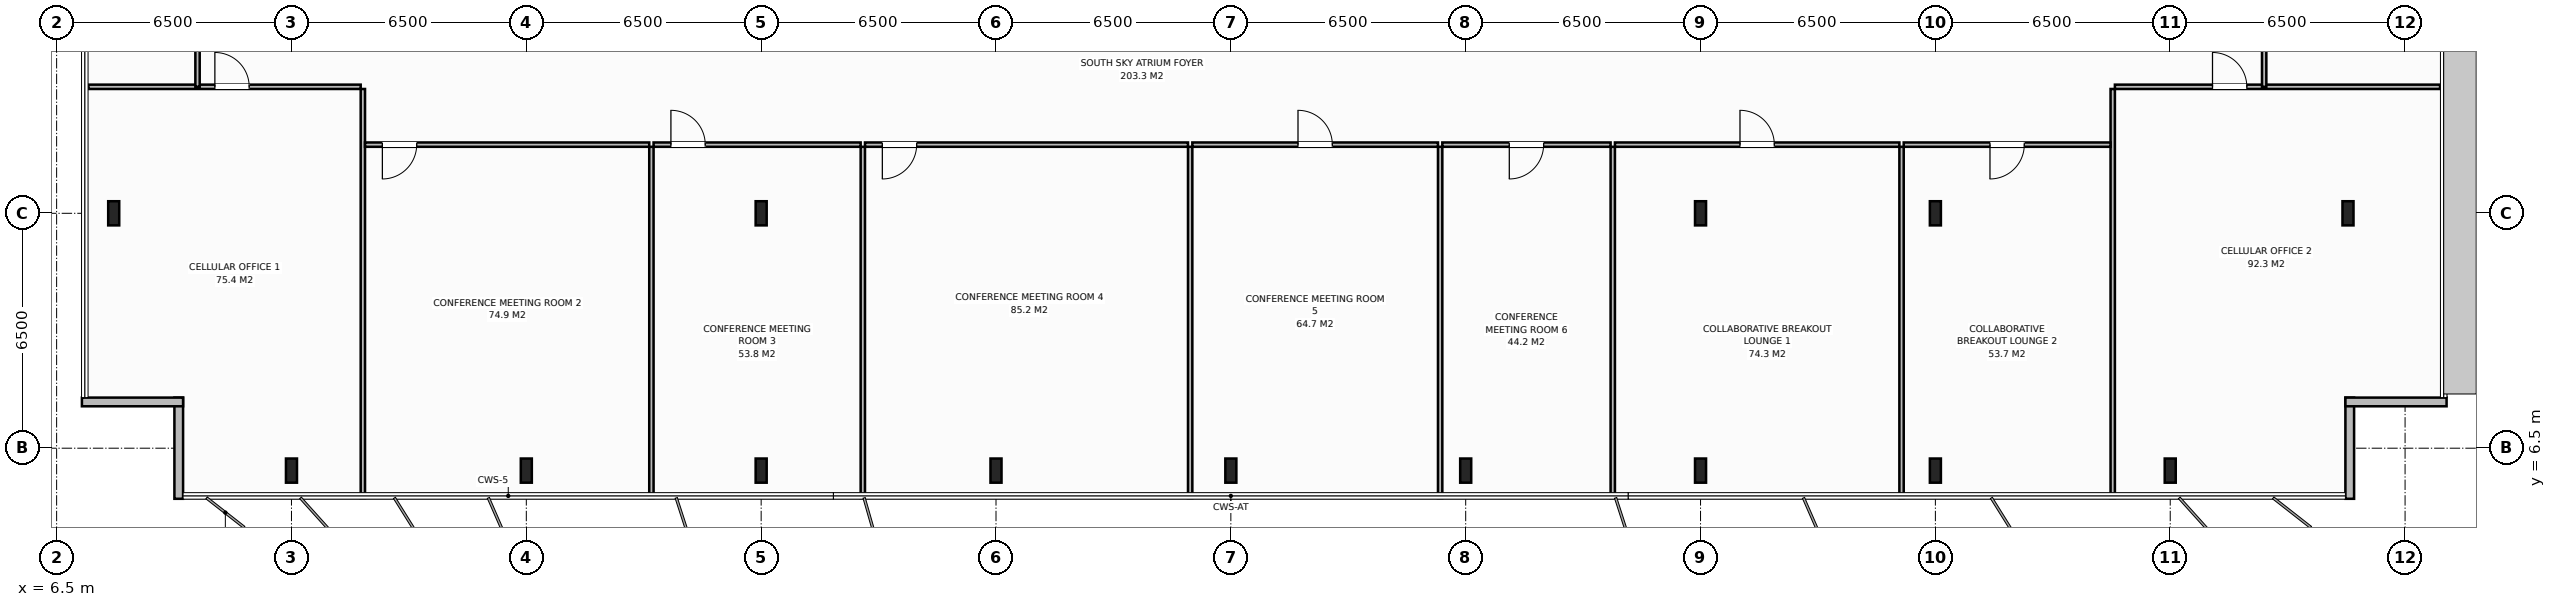
"""IFC4 building model, lengths in metres.
Left out: names, types, materials, properties, quantities, classifications, styles, units other than length and angle.
Written with IfcOpenShell. Run it as: python <this file> out.ifc"""

import sys

from ifc_helpers import new_model, si_unit, direction, frame, frame_2d, origin, origin_2d, place, context, subcontext, project, spatial, rectangle, i_section, extrude, element, fill, save


model = new_model("IFC4")
c1 = context("Model", 3, precision=1e-05, world=origin(), true_north=direction((0.0, 1.0)))
c2 = subcontext(c1, "Body", "Model", "MODEL_VIEW")
j1 = project(units=[si_unit("LENGTHUNIT", "METRE"), si_unit("PLANEANGLEUNIT", "RADIAN")], contexts=[c1])
p1 = place(None, origin())
s1 = spatial("IfcSite", under=j1, at=p1, CompositionType="ELEMENT")
p2 = place(p1, origin())
s2 = spatial("IfcBuilding", under=s1, at=p2, CompositionType="ELEMENT")
p3 = place(p2, frame((0.0, 0.0, 282.4)))
s3 = spatial("IfcBuildingStorey", under=s2, at=p3, CompositionType="ELEMENT", Elevation=282.4)
for number, where, z_axis, x_axis in (
    (1, (58.5, 13.0, 0.0), (0.0, 0.0, 1.0), (1.0, 0.0, 0.0)),
    (2, (26.0, 13.0, 0.0), (0.0, 0.0, 1.0), (1.0, 0.0, 0.0)),
    (3, (52.0, 13.0, 0.0), (0.0, 0.0, 1.0), (1.0, 0.0, 0.0)),
    (4, (13.0, 5.88, 0.0), (0.0, 0.0, 1.0), (1.0, 0.0, 0.0)),
    (5, (19.5, 5.88, 0.0), (0.0, 0.0, 1.0), (1.0, 0.0, 0.0)),
    (6, (26.0, 5.88, 0.0), (0.0, 0.0, 1.0), (1.0, 0.0, 0.0)),
    (7, (32.5, 5.88, 0.0), (0.0, 0.0, 1.0), (1.0, 0.0, 0.0)),
    (8, (39.0, 5.88, 0.0), (0.0, 0.0, 1.0), (1.0, 0.0, 0.0)),
    (9, (45.5, 5.88, 0.0), (0.0, 0.0, 1.0), (1.0, 0.0, 0.0)),
    (10, (52.0, 5.88, 0.0), (0.0, 0.0, 1.0), (1.0, 0.0, 0.0)),
    (11, (58.5, 5.88, 0.0), (0.0, 0.0, 1.0), (1.0, 0.0, 0.0)),
    (12, (65.0, 5.88, 0.0), (0.0, 0.0, 1.0), (1.0, 0.0, 0.0)),
    (13, (8.08, 13.0, 0.0), (0.0, 0.0, 1.0), (1.0, 0.0, 0.0)),
    (14, (69.92, 13.0, 0.0), (0.0, 0.0, 1.0), (1.0, 0.0, 0.0)),
):
    element("IfcColumn", number, at=place(p3, frame(where, z_axis=z_axis, x_axis=x_axis)), inside=s3, PredefinedType="COLUMN", context=c2, shape_type="SweptSolid", body=[
        extrude(i_section(OverallWidth=0.305, OverallDepth=0.668, WebThickness=0.021, FlangeThickness=0.04, at=origin_2d()), origin(), (0.0, 0.0, 1.0), 4.0),
    ])
p4 = place(p3, frame((9.88, 5.1, 0.0), z_axis=(0.0, 0.0, 1.0), x_axis=(0.0, 1.0, 0.0)))
e15 = element("IfcWall", 15, at=p4, inside=s3, PredefinedType="STANDARD", context=c2, shape_type="SweptSolid", body=[
    extrude(rectangle(XDim=2.8, YDim=0.24, at=frame_2d((1.4, 0.0))), origin(), (0.0, 0.0, 1.0), 3.788),
])
p5 = place(p3, frame((10.0, 7.78, 0.0), z_axis=(0.0, 0.0, 1.0), x_axis=(-1.0, 0.0, 0.0)))
e16 = element("IfcWall", 16, at=p5, inside=s3, PredefinedType="STANDARD", context=c2, shape_type="SweptSolid", body=[
    extrude(rectangle(XDim=2.8, YDim=0.24, at=frame_2d((1.4, 0.0))), origin(), (0.0, 0.0, 1.0), 3.788),
])
p6 = place(p3, frame((69.969, 7.9, 0.0), z_axis=(0.0, 0.0, 1.0), x_axis=(0.0, -1.0, 0.0)))
e17 = element("IfcWall", 17, at=p6, inside=s3, PredefinedType="STANDARD", context=c2, shape_type="SweptSolid", body=[
    extrude(rectangle(XDim=2.8, YDim=0.24, at=frame_2d((1.4, 0.0))), origin(), (0.0, 0.0, 1.0), 3.788),
])
p7 = place(p3, frame((72.649, 7.78, 0.0), z_axis=(0.0, 0.0, 1.0), x_axis=(-1.0, 0.0, 0.0)))
e18 = element("IfcWall", 18, at=p7, inside=s3, PredefinedType="STANDARD", context=c2, shape_type="SweptSolid", body=[
    extrude(rectangle(XDim=2.8, YDim=0.24, at=frame_2d((1.4, 0.0))), origin(), (0.0, 0.0, 1.0), 3.788),
])
p8 = place(p3, frame((14.976, 5.12, 0.0), z_axis=(0.0, 0.0, 1.0), x_axis=(0.0, 1.0, 0.0)))
e19 = element("IfcWall", 19, at=p8, inside=s3, PredefinedType="PARTITIONING", context=c2, shape_type="SweptSolid", body=[
    extrude(rectangle(XDim=11.32, YDim=0.12, at=frame_2d((5.66, 0.0))), origin(), (0.0, 0.0, 1.0), 3.788),
])
p9 = place(p3, frame((7.38, 16.5, 0.0), z_axis=(0.0, 0.0, 1.0), x_axis=(1.0, 0.0, 0.0)))
e20 = element("IfcWall", 20, at=p9, inside=s3, PredefinedType="PARTITIONING", context=c2, shape_type="SweptSolid", body=[
    extrude(rectangle(XDim=7.536, YDim=0.12, at=frame_2d((3.768, 0.0))), origin(), (0.0, 0.0, 1.0), 3.788),
])
p10 = place(p9, frame((3.5, 0.0, 0.0)))
e21 = element("IfcOpeningElement", 21, at=p10, cuts=e20, PredefinedType="OPENING", context=c2, shape_type="SweptSolid", body=[
    extrude(rectangle(XDim=0.95, YDim=2.15, at=frame_2d((0.475, 1.075))), frame((0.0, 0.07, 0.0), z_axis=(0.0, -1.0, 0.0), x_axis=(1.0, 0.0, 0.0)), (0.0, 0.0, 1.0), 0.14),
])
p11 = place(p3, frame((22.962, 5.12, 0.0), z_axis=(0.0, 0.0, 1.0), x_axis=(0.0, 1.0, 0.0)))
e22 = element("IfcWall", 22, at=p11, inside=s3, PredefinedType="PARTITIONING", context=c2, shape_type="SweptSolid", body=[
    extrude(rectangle(XDim=9.72, YDim=0.12, at=frame_2d((4.86, 0.0))), origin(), (0.0, 0.0, 1.0), 3.788),
])
p12 = place(p3, frame((15.036, 14.9, 0.0), z_axis=(0.0, 0.0, 1.0), x_axis=(1.0, 0.0, 0.0)))
e23 = element("IfcWall", 23, at=p12, inside=s3, PredefinedType="PARTITIONING", context=c2, shape_type="SweptSolid", body=[
    extrude(rectangle(XDim=7.866, YDim=0.12, at=frame_2d((3.933, 0.0))), origin(), (0.0, 0.0, 1.0), 3.788),
])
p13 = place(p12, frame((0.48, 0.0, 0.0)))
e24 = element("IfcOpeningElement", 24, at=p13, cuts=e23, PredefinedType="OPENING", context=c2, shape_type="SweptSolid", body=[
    extrude(rectangle(XDim=0.95, YDim=2.15, at=frame_2d((0.475, 1.075))), frame((0.0, 0.07, 0.0), z_axis=(0.0, -1.0, 0.0), x_axis=(1.0, 0.0, 0.0)), (0.0, 0.0, 1.0), 0.14),
])
p14 = place(p3, frame((28.814, 5.12, 0.0), z_axis=(0.0, 0.0, 1.0), x_axis=(0.0, 1.0, 0.0)))
e25 = element("IfcWall", 25, at=p14, inside=s3, PredefinedType="PARTITIONING", context=c2, shape_type="SweptSolid", body=[
    extrude(rectangle(XDim=9.72, YDim=0.12, at=frame_2d((4.86, 0.0))), origin(), (0.0, 0.0, 1.0), 3.788),
])
p15 = place(p3, frame((23.022, 14.9, 0.0), z_axis=(0.0, 0.0, 1.0), x_axis=(1.0, 0.0, 0.0)))
e26 = element("IfcWall", 26, at=p15, inside=s3, PredefinedType="PARTITIONING", context=c2, shape_type="SweptSolid", body=[
    extrude(rectangle(XDim=5.732, YDim=0.12, at=frame_2d((2.866, 0.0))), origin(), (0.0, 0.0, 1.0), 3.788),
])
p16 = place(p15, frame((0.48, 0.0, 0.0)))
e27 = element("IfcOpeningElement", 27, at=p16, cuts=e26, PredefinedType="OPENING", context=c2, shape_type="SweptSolid", body=[
    extrude(rectangle(XDim=0.95, YDim=2.15, at=frame_2d((0.475, 1.075))), frame((0.0, 0.07, 0.0), z_axis=(0.0, -1.0, 0.0), x_axis=(1.0, 0.0, 0.0)), (0.0, 0.0, 1.0), 0.14),
])
p17 = place(p3, frame((37.874, 5.12, 0.0), z_axis=(0.0, 0.0, 1.0), x_axis=(0.0, 1.0, 0.0)))
e28 = element("IfcWall", 28, at=p17, inside=s3, PredefinedType="PARTITIONING", context=c2, shape_type="SweptSolid", body=[
    extrude(rectangle(XDim=9.72, YDim=0.12, at=frame_2d((4.86, 0.0))), origin(), (0.0, 0.0, 1.0), 3.788),
])
p18 = place(p3, frame((28.874, 14.9, 0.0), z_axis=(0.0, 0.0, 1.0), x_axis=(1.0, 0.0, 0.0)))
e29 = element("IfcWall", 29, at=p18, inside=s3, PredefinedType="PARTITIONING", context=c2, shape_type="SweptSolid", body=[
    extrude(rectangle(XDim=8.94, YDim=0.12, at=frame_2d((4.47, 0.0))), origin(), (0.0, 0.0, 1.0), 3.788),
])
p19 = place(p18, frame((0.48, 0.0, 0.0)))
e30 = element("IfcOpeningElement", 30, at=p19, cuts=e29, PredefinedType="OPENING", context=c2, shape_type="SweptSolid", body=[
    extrude(rectangle(XDim=0.95, YDim=2.15, at=frame_2d((0.475, 1.075))), frame((0.0, 0.07, 0.0), z_axis=(0.0, -1.0, 0.0), x_axis=(1.0, 0.0, 0.0)), (0.0, 0.0, 1.0), 0.14),
])
p20 = place(p3, frame((44.793, 5.12, 0.0), z_axis=(0.0, 0.0, 1.0), x_axis=(0.0, 1.0, 0.0)))
e31 = element("IfcWall", 31, at=p20, inside=s3, PredefinedType="PARTITIONING", context=c2, shape_type="SweptSolid", body=[
    extrude(rectangle(XDim=9.72, YDim=0.12, at=frame_2d((4.86, 0.0))), origin(), (0.0, 0.0, 1.0), 3.788),
])
p21 = place(p3, frame((37.934, 14.9, 0.0), z_axis=(0.0, 0.0, 1.0), x_axis=(1.0, 0.0, 0.0)))
e32 = element("IfcWall", 32, at=p21, inside=s3, PredefinedType="PARTITIONING", context=c2, shape_type="SweptSolid", body=[
    extrude(rectangle(XDim=6.799, YDim=0.12, at=frame_2d((3.399, 0.0))), origin(), (0.0, 0.0, 1.0), 3.788),
])
p22 = place(p21, frame((2.925, 0.0, 0.0)))
e33 = element("IfcOpeningElement", 33, at=p22, cuts=e32, PredefinedType="OPENING", context=c2, shape_type="SweptSolid", body=[
    extrude(rectangle(XDim=0.95, YDim=2.15, at=frame_2d((0.475, 1.075))), frame((0.0, 0.07, 0.0), z_axis=(0.0, -1.0, 0.0), x_axis=(1.0, 0.0, 0.0)), (0.0, 0.0, 1.0), 0.14),
])
p23 = place(p3, frame((49.571, 5.12, 0.0), z_axis=(0.0, 0.0, 1.0), x_axis=(0.0, 1.0, 0.0)))
e34 = element("IfcWall", 34, at=p23, inside=s3, PredefinedType="PARTITIONING", context=c2, shape_type="SweptSolid", body=[
    extrude(rectangle(XDim=9.72, YDim=0.12, at=frame_2d((4.86, 0.0))), origin(), (0.0, 0.0, 1.0), 3.788),
])
p24 = place(p3, frame((44.853, 14.9, 0.0), z_axis=(0.0, 0.0, 1.0), x_axis=(1.0, 0.0, 0.0)))
e35 = element("IfcWall", 35, at=p24, inside=s3, PredefinedType="PARTITIONING", context=c2, shape_type="SweptSolid", body=[
    extrude(rectangle(XDim=4.657, YDim=0.12, at=frame_2d((2.329, 0.0))), origin(), (0.0, 0.0, 1.0), 3.788),
])
p25 = place(p24, frame((1.854, 0.0, 0.0)))
e36 = element("IfcOpeningElement", 36, at=p25, cuts=e35, PredefinedType="OPENING", context=c2, shape_type="SweptSolid", body=[
    extrude(rectangle(XDim=0.95, YDim=2.15, at=frame_2d((0.475, 1.075))), frame((0.0, 0.07, 0.0), z_axis=(0.0, -1.0, 0.0), x_axis=(1.0, 0.0, 0.0)), (0.0, 0.0, 1.0), 0.14),
])
p26 = place(p3, frame((57.563, 5.12, 0.0), z_axis=(0.0, 0.0, 1.0), x_axis=(0.0, 1.0, 0.0)))
e37 = element("IfcWall", 37, at=p26, inside=s3, PredefinedType="PARTITIONING", context=c2, shape_type="SweptSolid", body=[
    extrude(rectangle(XDim=9.72, YDim=0.12, at=frame_2d((4.86, 0.0))), origin(), (0.0, 0.0, 1.0), 3.788),
])
p27 = place(p3, frame((49.631, 14.9, 0.0), z_axis=(0.0, 0.0, 1.0), x_axis=(1.0, 0.0, 0.0)))
e38 = element("IfcWall", 38, at=p27, inside=s3, PredefinedType="PARTITIONING", context=c2, shape_type="SweptSolid", body=[
    extrude(rectangle(XDim=7.873, YDim=0.12, at=frame_2d((3.937, 0.0))), origin(), (0.0, 0.0, 1.0), 3.788),
])
p28 = place(p27, frame((3.461, 0.0, 0.0)))
e39 = element("IfcOpeningElement", 39, at=p28, cuts=e38, PredefinedType="OPENING", context=c2, shape_type="SweptSolid", body=[
    extrude(rectangle(XDim=0.95, YDim=2.15, at=frame_2d((0.475, 1.075))), frame((0.0, 0.07, 0.0), z_axis=(0.0, -1.0, 0.0), x_axis=(1.0, 0.0, 0.0)), (0.0, 0.0, 1.0), 0.14),
])
p29 = place(p3, frame((63.408, 5.12, 0.0), z_axis=(0.0, 0.0, 1.0), x_axis=(0.0, 1.0, 0.0)))
e40 = element("IfcWall", 40, at=p29, inside=s3, PredefinedType="PARTITIONING", context=c2, shape_type="SweptSolid", body=[
    extrude(rectangle(XDim=11.32, YDim=0.12, at=frame_2d((5.66, 0.0))), origin(), (0.0, 0.0, 1.0), 3.788),
])
p30 = place(p3, frame((57.624, 14.9, 0.0), z_axis=(0.0, 0.0, 1.0), x_axis=(1.0, 0.0, 0.0)))
e41 = element("IfcWall", 41, at=p30, inside=s3, PredefinedType="PARTITIONING", context=c2, shape_type="SweptSolid", body=[
    extrude(rectangle(XDim=5.725, YDim=0.12, at=frame_2d((2.862, 0.0))), origin(), (0.0, 0.0, 1.0), 3.788),
])
p31 = place(p30, frame((2.387, 0.0, 0.0)))
e42 = element("IfcOpeningElement", 42, at=p31, cuts=e41, PredefinedType="OPENING", context=c2, shape_type="SweptSolid", body=[
    extrude(rectangle(XDim=0.95, YDim=2.15, at=frame_2d((0.475, 1.075))), frame((0.0, 0.07, 0.0), z_axis=(0.0, -1.0, 0.0), x_axis=(1.0, 0.0, 0.0)), (0.0, 0.0, 1.0), 0.14),
])
p32 = place(p3, frame((63.469, 16.5, 0.0), z_axis=(0.0, 0.0, 1.0), x_axis=(1.0, 0.0, 0.0)))
e43 = element("IfcWall", 43, at=p32, inside=s3, PredefinedType="PARTITIONING", context=c2, shape_type="SweptSolid", body=[
    extrude(rectangle(XDim=9.0, YDim=0.12, at=frame_2d((4.5, 0.0))), origin(), (0.0, 0.0, 1.0), 3.788),
])
p33 = place(p32, frame((2.701, 0.0, 0.0)))
e44 = element("IfcOpeningElement", 44, at=p33, cuts=e43, PredefinedType="OPENING", context=c2, shape_type="SweptSolid", body=[
    extrude(rectangle(XDim=0.95, YDim=2.15, at=frame_2d((0.475, 1.075))), frame((0.0, 0.07, 0.0), z_axis=(0.0, -1.0, 0.0), x_axis=(1.0, 0.0, 0.0)), (0.0, 0.0, 1.0), 0.14),
])
p34 = place(p3, frame((10.4, 16.5, 0.0), z_axis=(0.0, 0.0, 1.0), x_axis=(0.0, 1.0, 0.0)))
e45 = element("IfcWall", 45, at=p34, inside=s3, PredefinedType="PARTITIONING", context=c2, shape_type="SweptSolid", body=[
    extrude(rectangle(XDim=9.5, YDim=0.12, at=frame_2d((4.75, 0.0))), origin(), (0.0, 0.0, 1.0), 3.788),
])
p35 = place(p34, frame((5.325, 0.0, 0.0)))
e46 = element("IfcOpeningElement", 46, at=p35, cuts=e45, PredefinedType="OPENING", context=c2, shape_type="SweptSolid", body=[
    extrude(rectangle(XDim=0.95, YDim=2.15, at=frame_2d((0.475, 1.075))), frame((0.0, 0.07, 0.0), z_axis=(0.0, -1.0, 0.0), x_axis=(1.0, 0.0, 0.0)), (0.0, 0.0, 1.0), 0.14),
])
p36 = place(p3, frame((67.6, 16.5, 0.0), z_axis=(0.0, 0.0, 1.0), x_axis=(0.0, 1.0, 0.0)))
e47 = element("IfcWall", 47, at=p36, inside=s3, PredefinedType="PARTITIONING", context=c2, shape_type="SweptSolid", body=[
    extrude(rectangle(XDim=19.0, YDim=0.12, at=frame_2d((9.5, 0.0))), origin(), (0.0, 0.0, 1.0), 3.788),
])
p37 = place(p36, frame((9.025, 0.0, 0.0)))
e48 = element("IfcOpeningElement", 48, at=p37, cuts=e47, PredefinedType="OPENING", context=c2, shape_type="SweptSolid", body=[
    extrude(rectangle(XDim=0.95, YDim=2.15, at=frame_2d((0.475, 1.075))), frame((0.0, 0.07, 0.0), z_axis=(0.0, -1.0, 0.0), x_axis=(1.0, 0.0, 0.0)), (0.0, 0.0, 1.0), 0.14),
])
p38 = place(p10, origin())
e49 = element("IfcDoor", 49, at=p38, inside=s3, OperationType="SINGLE_SWING_LEFT", PredefinedType="DOOR", context=c2, shape_type="SweptSolid", body=[
    extrude(rectangle(XDim=0.95, YDim=2.15, at=frame_2d((0.475, 1.075))), frame((0.0, 0.025, 0.0), z_axis=(0.0, -1.0, 0.0), x_axis=(1.0, 0.0, 0.0)), (0.0, 0.0, 1.0), 0.05),
])
fill(e21, e49)
p39 = place(p13, origin())
e50 = element("IfcDoor", 50, at=p39, inside=s3, OperationType="SINGLE_SWING_RIGHT", PredefinedType="DOOR", context=c2, shape_type="SweptSolid", body=[
    extrude(rectangle(XDim=0.95, YDim=2.15, at=frame_2d((0.475, 1.075))), frame((0.0, 0.025, 0.0), z_axis=(0.0, -1.0, 0.0), x_axis=(1.0, 0.0, 0.0)), (0.0, 0.0, 1.0), 0.05),
])
fill(e24, e50)
p40 = place(p16, origin())
e51 = element("IfcDoor", 51, at=p40, inside=s3, OperationType="SINGLE_SWING_LEFT", PredefinedType="DOOR", context=c2, shape_type="SweptSolid", body=[
    extrude(rectangle(XDim=0.95, YDim=2.15, at=frame_2d((0.475, 1.075))), frame((0.0, 0.025, 0.0), z_axis=(0.0, -1.0, 0.0), x_axis=(1.0, 0.0, 0.0)), (0.0, 0.0, 1.0), 0.05),
])
fill(e27, e51)
p41 = place(p19, origin())
e52 = element("IfcDoor", 52, at=p41, inside=s3, OperationType="SINGLE_SWING_RIGHT", PredefinedType="DOOR", context=c2, shape_type="SweptSolid", body=[
    extrude(rectangle(XDim=0.95, YDim=2.15, at=frame_2d((0.475, 1.075))), frame((0.0, 0.025, 0.0), z_axis=(0.0, -1.0, 0.0), x_axis=(1.0, 0.0, 0.0)), (0.0, 0.0, 1.0), 0.05),
])
fill(e30, e52)
p42 = place(p22, origin())
e53 = element("IfcDoor", 53, at=p42, inside=s3, OperationType="SINGLE_SWING_LEFT", PredefinedType="DOOR", context=c2, shape_type="SweptSolid", body=[
    extrude(rectangle(XDim=0.95, YDim=2.15, at=frame_2d((0.475, 1.075))), frame((0.0, 0.025, 0.0), z_axis=(0.0, -1.0, 0.0), x_axis=(1.0, 0.0, 0.0)), (0.0, 0.0, 1.0), 0.05),
])
fill(e33, e53)
p43 = place(p25, origin())
e54 = element("IfcDoor", 54, at=p43, inside=s3, OperationType="SINGLE_SWING_RIGHT", PredefinedType="DOOR", context=c2, shape_type="SweptSolid", body=[
    extrude(rectangle(XDim=0.95, YDim=2.15, at=frame_2d((0.475, 1.075))), frame((0.0, 0.025, 0.0), z_axis=(0.0, -1.0, 0.0), x_axis=(1.0, 0.0, 0.0)), (0.0, 0.0, 1.0), 0.05),
])
fill(e36, e54)
p44 = place(p28, origin())
e55 = element("IfcDoor", 55, at=p44, inside=s3, OperationType="SINGLE_SWING_LEFT", PredefinedType="DOOR", context=c2, shape_type="SweptSolid", body=[
    extrude(rectangle(XDim=0.95, YDim=2.15, at=frame_2d((0.475, 1.075))), frame((0.0, 0.025, 0.0), z_axis=(0.0, -1.0, 0.0), x_axis=(1.0, 0.0, 0.0)), (0.0, 0.0, 1.0), 0.05),
])
fill(e39, e55)
p45 = place(p31, origin())
e56 = element("IfcDoor", 56, at=p45, inside=s3, OperationType="SINGLE_SWING_RIGHT", PredefinedType="DOOR", context=c2, shape_type="SweptSolid", body=[
    extrude(rectangle(XDim=0.95, YDim=2.15, at=frame_2d((0.475, 1.075))), frame((0.0, 0.025, 0.0), z_axis=(0.0, -1.0, 0.0), x_axis=(1.0, 0.0, 0.0)), (0.0, 0.0, 1.0), 0.05),
])
fill(e42, e56)
p46 = place(p33, origin())
e57 = element("IfcDoor", 57, at=p46, inside=s3, OperationType="SINGLE_SWING_LEFT", PredefinedType="DOOR", context=c2, shape_type="SweptSolid", body=[
    extrude(rectangle(XDim=0.95, YDim=2.15, at=frame_2d((0.475, 1.075))), frame((0.0, 0.025, 0.0), z_axis=(0.0, -1.0, 0.0), x_axis=(1.0, 0.0, 0.0)), (0.0, 0.0, 1.0), 0.05),
])
fill(e44, e57)
save(model, sys.argv[1])
